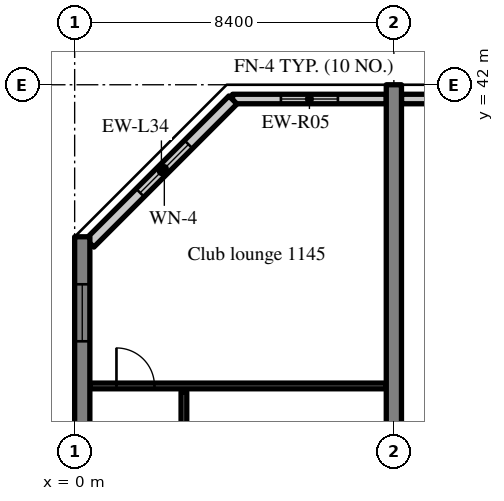
"""IFC4 building model, lengths in metres.
Left out: names, types, materials, properties, quantities, classifications, styles, units other than length and angle.
Written with IfcOpenShell. Run it as: python <this file> out.ifc"""

import sys

from ifc_helpers import new_model, si_unit, direction, frame, frame_2d, origin, place, context, subcontext, project, spatial, rectangle, extrude, source, transform, mapped, element, fill, save


model = new_model("IFC4")
c1 = context("Model", 3, precision=1e-05, world=origin(), true_north=direction((0.0, 1.0)))
c2 = subcontext(c1, "Body", "Model", "MODEL_VIEW")
j1 = project(units=[si_unit("LENGTHUNIT", "METRE"), si_unit("PLANEANGLEUNIT", "RADIAN")], contexts=[c1])
p1 = place(None, origin())
s1 = spatial("IfcSite", under=j1, at=p1, CompositionType="ELEMENT")
p2 = place(p1, origin())
s2 = spatial("IfcBuilding", under=s1, at=p2, CompositionType="ELEMENT")
p3 = place(p2, frame((0.0, 0.0, 50.6)))
s3 = spatial("IfcBuildingStorey", under=s2, at=p3, CompositionType="ELEMENT", Elevation=50.6)
m1 = source(origin(), c2, "Body", "SweptSolid", [
    extrude(rectangle(XDim=16.0, YDim=0.4, at=frame_2d((8.0, 0.0))), origin(), (0.0, 0.0, 1.0), 3.52),
])
p4 = place(p3, frame((0.2, 22.0, 0.0), z_axis=(0.0, 0.0, 1.0), x_axis=(0.0, 1.0, 0.0)))
e1 = element("IfcWall", 1, at=p4, inside=s3, PredefinedType="SHEAR", context=c2, shape_type="MappedRepresentation", body=[
    mapped(m1, transform((0.0, 0.0, 0.0), scale=1.0)),
])
m2 = source(origin(), c2, "Body", "SweptSolid", [
    extrude(rectangle(XDim=1.5, YDim=1.5, at=frame_2d((0.75, 0.75))), frame((0.0, 0.21, 0.0), z_axis=(0.0, -1.0, 0.0), x_axis=(1.0, 0.0, 0.0)), (0.0, 0.0, 1.0), 0.42),
])
p5 = place(p4, frame((1.25, 0.0, 0.9)))
e2 = element("IfcOpeningElement", 2, at=p5, cuts=e1, PredefinedType="OPENING", context=c2, shape_type="MappedRepresentation", body=[
    mapped(m2, transform((0.0, 0.0, 0.0), scale=1.0)),
])
p6 = place(p4, frame((5.25, 0.0, 0.9)))
e3 = element("IfcOpeningElement", 3, at=p6, cuts=e1, PredefinedType="OPENING", context=c2, shape_type="MappedRepresentation", body=[
    mapped(m2, transform((0.0, 0.0, 0.0), scale=1.0)),
])
p7 = place(p4, frame((9.25, 0.0, 0.9)))
e4 = element("IfcOpeningElement", 4, at=p7, cuts=e1, PredefinedType="OPENING", context=c2, shape_type="MappedRepresentation", body=[
    mapped(m2, transform((0.0, 0.0, 0.0), scale=1.0)),
])
p8 = place(p4, frame((13.25, 0.0, 0.9)))
e5 = element("IfcOpeningElement", 5, at=p8, cuts=e1, PredefinedType="OPENING", context=c2, shape_type="MappedRepresentation", body=[
    mapped(m2, transform((0.0, 0.0, 0.0), scale=1.0)),
])
m3 = source(origin(), c2, "Body", "SweptSolid", [
    extrude(rectangle(XDim=20.0, YDim=0.4, at=frame_2d((10.0, 0.0))), origin(), (0.0, 0.0, 1.0), 3.52),
])
p9 = place(p3, frame((8.4, 22.0, 0.0), z_axis=(0.0, 0.0, 1.0), x_axis=(0.0, 1.0, 0.0)))
e6 = element("IfcWall", 6, at=p9, inside=s3, PredefinedType="SHEAR", context=c2, shape_type="MappedRepresentation", body=[
    mapped(m3, transform((0.0, 0.0, 0.0), scale=1.0)),
])
m4 = source(origin(), c2, "Body", "SweptSolid", [
    extrude(rectangle(XDim=4.045, YDim=0.25, at=frame_2d((2.022, 0.0))), origin(), (0.0, 0.0, 1.0), 2.82),
])
p10 = place(p3, frame((8.2, 41.625, 0.0), z_axis=(0.0, 0.0, 1.0), x_axis=(-1.0, 0.0, 0.0)))
e7 = element("IfcWall", 7, at=p10, inside=s3, PredefinedType="SOLIDWALL", context=c2, shape_type="MappedRepresentation", body=[
    mapped(m4, transform((0.0, 0.0, 0.0), scale=1.0)),
])
m5 = source(origin(), c2, "Body", "SweptSolid", [
    extrude(rectangle(XDim=1.5, YDim=1.5, at=frame_2d((0.75, 0.75))), frame((0.0, 0.135, 0.0), z_axis=(0.0, -1.0, 0.0), x_axis=(1.0, 0.0, 0.0)), (0.0, 0.0, 1.0), 0.27),
])
p11 = place(p10, frame((1.272, 0.0, 0.9)))
e8 = element("IfcOpeningElement", 8, at=p11, cuts=e7, PredefinedType="OPENING", context=c2, shape_type="MappedRepresentation", body=[
    mapped(m5, transform((0.0, 0.0, 0.0), scale=1.0)),
])
m6 = source(origin(), c2, "Body", "SweptSolid", [
    extrude(rectangle(XDim=3.6, YDim=0.25, at=frame_2d((1.8, 0.0))), origin(), (0.0, 0.0, 1.0), 2.82),
])
p12 = place(p3, frame((12.2, 41.625, 0.0), z_axis=(0.0, 0.0, 1.0), x_axis=(-1.0, 0.0, 0.0)))
e9 = element("IfcWall", 9, at=p12, inside=s3, PredefinedType="SOLIDWALL", context=c2, shape_type="MappedRepresentation", body=[
    mapped(m6, transform((0.0, 0.0, 0.0), scale=1.0)),
])
p13 = place(p12, frame((1.05, 0.0, 0.9)))
e10 = element("IfcOpeningElement", 10, at=p13, cuts=e9, PredefinedType="OPENING", context=c2, shape_type="MappedRepresentation", body=[
    mapped(m5, transform((0.0, 0.0, 0.0), scale=1.0)),
])
m7 = source(origin(), c2, "Body", "SweptSolid", [
    extrude(rectangle(XDim=5.326, YDim=0.3, at=frame_2d((2.663, 0.0))), origin(), (0.0, 0.0, 1.0), 3.52),
])
p14 = place(p3, frame((4.166, 41.6, 0.0), z_axis=(0.0, 0.0, 1.0), x_axis=(-0.707106781187, -0.707106781187, 0.0)))
e11 = element("IfcWall", 11, at=p14, inside=s3, PredefinedType="SOLIDWALL", context=c2, shape_type="MappedRepresentation", body=[
    mapped(m7, transform((0.0, 0.0, 0.0), scale=1.0)),
])
m8 = source(origin(), c2, "Body", "SweptSolid", [
    extrude(rectangle(XDim=1.8, YDim=1.5, at=frame_2d((0.9, 0.75))), frame((0.0, 0.16, 0.0), z_axis=(0.0, -1.0, 0.0), x_axis=(1.0, 0.0, 0.0)), (0.0, 0.0, 1.0), 0.32),
])
p15 = place(p14, frame((1.654, 0.0, 0.9)))
e12 = element("IfcOpeningElement", 12, at=p15, cuts=e11, PredefinedType="OPENING", context=c2, shape_type="MappedRepresentation", body=[
    mapped(m8, transform((0.0, 0.0, 0.0), scale=1.0)),
])
m9 = source(origin(), c2, "Body", "SweptSolid", [
    extrude(rectangle(XDim=3.85, YDim=0.15, at=frame_2d((1.925, 0.0))), origin(), (0.0, 0.0, 1.0), 3.52),
])
p16 = place(p3, frame((2.875, 30.075, 0.0), z_axis=(0.0, 0.0, 1.0), x_axis=(0.0, 1.0, 0.0)))
e13 = element("IfcWall", 13, at=p16, inside=s3, PredefinedType="PARTITIONING", context=c2, shape_type="MappedRepresentation", body=[
    mapped(m9, transform((0.0, 0.0, 0.0), scale=1.0)),
])
m10 = source(origin(), c2, "Body", "SweptSolid", [
    extrude(rectangle(XDim=1.0, YDim=2.1, at=frame_2d((0.5, 1.05))), frame((0.0, 0.085, 0.0), z_axis=(0.0, -1.0, 0.0), x_axis=(1.0, 0.0, 0.0)), (0.0, 0.0, 1.0), 0.17),
])
p17 = place(p16, frame((1.425, 0.0, 0.0)))
e14 = element("IfcOpeningElement", 14, at=p17, cuts=e13, PredefinedType="OPENING", context=c2, shape_type="MappedRepresentation", body=[
    mapped(m10, transform((0.0, 0.0, 0.0), scale=1.0)),
])
m11 = source(origin(), c2, "Body", "SweptSolid", [
    extrude(rectangle(XDim=7.8, YDim=0.15, at=frame_2d((3.9, 0.0))), origin(), (0.0, 0.0, 1.0), 3.52),
])
p18 = place(p3, frame((0.4, 34.075, 0.0), z_axis=(0.0, 0.0, 1.0), x_axis=(1.0, 0.0, 0.0)))
e15 = element("IfcWall", 15, at=p18, inside=s3, PredefinedType="PARTITIONING", context=c2, shape_type="MappedRepresentation", body=[
    mapped(m11, transform((0.0, 0.0, 0.0), scale=1.0)),
])
p19 = place(p18, frame((0.7, 0.0, 0.0)))
e16 = element("IfcOpeningElement", 16, at=p19, cuts=e15, PredefinedType="OPENING", context=c2, shape_type="MappedRepresentation", body=[
    mapped(m10, transform((0.0, 0.0, 0.0), scale=1.0)),
])
m12 = source(origin(), c2, "Body", "SweptSolid", [
    extrude(rectangle(XDim=1.5, YDim=1.5, at=frame_2d((0.75, 0.75))), frame((0.0, 0.03, 0.0), z_axis=(0.0, -1.0, 0.0), x_axis=(1.0, 0.0, 0.0)), (0.0, 0.0, 1.0), 0.06),
])
p20 = place(p11, origin())
e17 = element("IfcWindow", 17, at=p20, inside=s3, PartitioningType="SINGLE_PANEL", PredefinedType="WINDOW", context=c2, shape_type="MappedRepresentation", body=[
    mapped(m12, transform((0.0, 0.0, 0.0), scale=1.0)),
])
fill(e8, e17)
m13 = source(origin(), c2, "Body", "SweptSolid", [
    extrude(rectangle(XDim=1.8, YDim=1.5, at=frame_2d((0.9, 0.75))), frame((0.0, 0.03, 0.0), z_axis=(0.0, -1.0, 0.0), x_axis=(1.0, 0.0, 0.0)), (0.0, 0.0, 1.0), 0.06),
])
p21 = place(p15, origin())
e18 = element("IfcWindow", 18, at=p21, inside=s3, PartitioningType="SINGLE_PANEL", PredefinedType="WINDOW", context=c2, shape_type="MappedRepresentation", body=[
    mapped(m13, transform((0.0, 0.0, 0.0), scale=1.0)),
])
fill(e12, e18)
p22 = place(p8, origin())
e19 = element("IfcWindow", 19, at=p22, inside=s3, PartitioningType="SINGLE_PANEL", PredefinedType="WINDOW", context=c2, shape_type="MappedRepresentation", body=[
    mapped(m12, transform((0.0, 0.0, 0.0), scale=1.0)),
])
fill(e5, e19)
m14 = source(origin(), c2, "Body", "SweptSolid", [
    extrude(rectangle(XDim=1.0, YDim=2.1, at=frame_2d((0.5, 1.05))), frame((0.0, 0.025, 0.0), z_axis=(0.0, -1.0, 0.0), x_axis=(1.0, 0.0, 0.0)), (0.0, 0.0, 1.0), 0.05),
])
p23 = place(p19, origin())
e20 = element("IfcDoor", 20, at=p23, inside=s3, OperationType="SINGLE_SWING_LEFT", PredefinedType="DOOR", context=c2, shape_type="MappedRepresentation", body=[
    mapped(m14, transform((0.0, 0.0, 0.0), scale=1.0)),
])
fill(e16, e20)
save(model, sys.argv[1])
